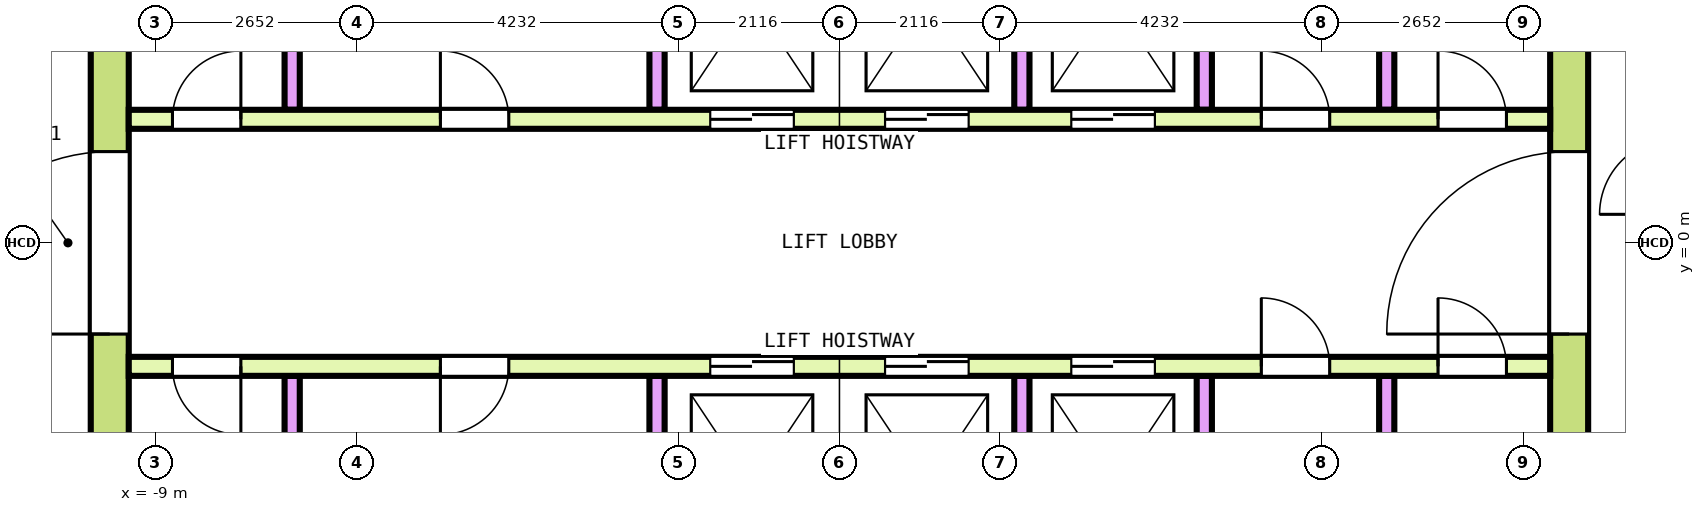
"""IFC4 building model, lengths in metres.
Left out: names, types, materials, properties, quantities, classifications, styles, units other than length and angle.
Written with IfcOpenShell. Run it as: python <this file> out.ifc"""

import sys

from ifc_helpers import new_model, si_unit, direction, frame, frame_2d, origin, place, context, subcontext, project, spatial, rectangle, extrude, element, fill, save


model = new_model("IFC4")
c1 = context("Model", 3, precision=1e-05, world=origin(), true_north=direction((0.0, 1.0)))
c2 = subcontext(c1, "Body", "Model", "MODEL_VIEW")
j1 = project(units=[si_unit("LENGTHUNIT", "METRE"), si_unit("PLANEANGLEUNIT", "RADIAN")], contexts=[c1])
p1 = place(None, origin())
s1 = spatial("IfcSite", under=j1, at=p1, CompositionType="ELEMENT")
p2 = place(p1, origin())
s2 = spatial("IfcBuilding", under=s1, at=p2, CompositionType="ELEMENT")
p3 = place(p2, frame((0.0, 0.0, 253.4)))
s3 = spatial("IfcBuildingStorey", under=s2, at=p3, CompositionType="ELEMENT", Elevation=253.4)
p4 = place(p3, frame((-9.6, -7.8, 0.0), z_axis=(0.0, 0.0, 1.0), x_axis=(0.0, 1.0, 0.0)))
e1 = element("IfcWall", 1, at=p4, inside=s3, PredefinedType="SHEAR", context=c2, shape_type="SweptSolid", body=[
    extrude(rectangle(XDim=15.6, YDim=0.5, at=frame_2d((7.8, 0.0))), origin(), (0.0, 0.0, 1.0), 3.7),
])
p5 = place(p4, frame((6.6, 0.0, 0.0)))
e2 = element("IfcOpeningElement", 2, at=p5, cuts=e1, PredefinedType="OPENING", context=c2, shape_type="SweptSolid", body=[
    extrude(rectangle(XDim=2.4, YDim=2.1, at=frame_2d((1.2, 1.05))), frame((0.0, 0.26, 0.0), z_axis=(0.0, -1.0, 0.0), x_axis=(1.0, 0.0, 0.0)), (0.0, 0.0, 1.0), 0.52),
])
p6 = place(p4, frame((13.5, 0.0, 0.0)))
e3 = element("IfcOpeningElement", 3, at=p6, cuts=e1, PredefinedType="OPENING", context=c2, shape_type="SweptSolid", body=[
    extrude(rectangle(XDim=1.2, YDim=2.1, at=frame_2d((0.6, 1.05))), frame((0.0, 0.26, 0.0), z_axis=(0.0, -1.0, 0.0), x_axis=(1.0, 0.0, 0.0)), (0.0, 0.0, 1.0), 0.52),
])
p7 = place(p4, frame((0.9, 0.0, 0.0)))
e4 = element("IfcOpeningElement", 4, at=p7, cuts=e1, PredefinedType="OPENING", context=c2, shape_type="SweptSolid", body=[
    extrude(rectangle(XDim=1.2, YDim=2.1, at=frame_2d((0.6, 1.05))), frame((0.0, 0.26, 0.0), z_axis=(0.0, -1.0, 0.0), x_axis=(1.0, 0.0, 0.0)), (0.0, 0.0, 1.0), 0.52),
])
p8 = place(p3, frame((9.6, -7.8, 0.0), z_axis=(0.0, 0.0, 1.0), x_axis=(0.0, 1.0, 0.0)))
e5 = element("IfcWall", 5, at=p8, inside=s3, PredefinedType="SHEAR", context=c2, shape_type="SweptSolid", body=[
    extrude(rectangle(XDim=15.6, YDim=0.5, at=frame_2d((7.8, 0.0))), origin(), (0.0, 0.0, 1.0), 3.7),
])
p9 = place(p8, frame((6.6, 0.0, 0.0)))
e6 = element("IfcOpeningElement", 6, at=p9, cuts=e5, PredefinedType="OPENING", context=c2, shape_type="SweptSolid", body=[
    extrude(rectangle(XDim=2.4, YDim=2.1, at=frame_2d((1.2, 1.05))), frame((0.0, 0.26, 0.0), z_axis=(0.0, -1.0, 0.0), x_axis=(1.0, 0.0, 0.0)), (0.0, 0.0, 1.0), 0.52),
])
p10 = place(p8, frame((13.5, 0.0, 0.0)))
e7 = element("IfcOpeningElement", 7, at=p10, cuts=e5, PredefinedType="OPENING", context=c2, shape_type="SweptSolid", body=[
    extrude(rectangle(XDim=1.2, YDim=2.1, at=frame_2d((0.6, 1.05))), frame((0.0, 0.26, 0.0), z_axis=(0.0, -1.0, 0.0), x_axis=(1.0, 0.0, 0.0)), (0.0, 0.0, 1.0), 0.52),
])
p11 = place(p8, frame((1.0, 0.0, 0.0)))
e8 = element("IfcOpeningElement", 8, at=p11, cuts=e5, PredefinedType="OPENING", context=c2, shape_type="SweptSolid", body=[
    extrude(rectangle(XDim=1.0, YDim=2.1, at=frame_2d((0.5, 1.05))), frame((0.0, 0.26, 0.0), z_axis=(0.0, -1.0, 0.0), x_axis=(1.0, 0.0, 0.0)), (0.0, 0.0, 1.0), 0.52),
])
p12 = place(p3, frame((-9.35, 1.625, 0.0), z_axis=(0.0, 0.0, 1.0), x_axis=(1.0, 0.0, 0.0)))
e9 = element("IfcWall", 9, at=p12, inside=s3, PredefinedType="SOLIDWALL", context=c2, shape_type="SweptSolid", body=[
    extrude(rectangle(XDim=18.7, YDim=0.25, at=frame_2d((9.35, 0.0))), origin(), (0.0, 0.0, 1.0), 3.7),
])
p13 = place(p12, frame((7.65, 0.0, 0.0)))
e10 = element("IfcOpeningElement", 10, at=p13, cuts=e9, PredefinedType="OPENING", context=c2, shape_type="SweptSolid", body=[
    extrude(rectangle(XDim=1.1, YDim=2.1, at=frame_2d((0.55, 1.05))), frame((0.0, 0.135, 0.0), z_axis=(0.0, -1.0, 0.0), x_axis=(1.0, 0.0, 0.0)), (0.0, 0.0, 1.0), 0.27),
])
p14 = place(p12, frame((9.95, 0.0, 0.0)))
e11 = element("IfcOpeningElement", 11, at=p14, cuts=e9, PredefinedType="OPENING", context=c2, shape_type="SweptSolid", body=[
    extrude(rectangle(XDim=1.1, YDim=2.1, at=frame_2d((0.55, 1.05))), frame((0.0, 0.135, 0.0), z_axis=(0.0, -1.0, 0.0), x_axis=(1.0, 0.0, 0.0)), (0.0, 0.0, 1.0), 0.27),
])
p15 = place(p12, frame((12.4, 0.0, 0.0)))
e12 = element("IfcOpeningElement", 12, at=p15, cuts=e9, PredefinedType="OPENING", context=c2, shape_type="SweptSolid", body=[
    extrude(rectangle(XDim=1.1, YDim=2.1, at=frame_2d((0.55, 1.05))), frame((0.0, 0.135, 0.0), z_axis=(0.0, -1.0, 0.0), x_axis=(1.0, 0.0, 0.0)), (0.0, 0.0, 1.0), 0.27),
])
p16 = place(p12, frame((0.575, 0.0, 0.0)))
e13 = element("IfcOpeningElement", 13, at=p16, cuts=e9, PredefinedType="OPENING", context=c2, shape_type="SweptSolid", body=[
    extrude(rectangle(XDim=0.9, YDim=2.1, at=frame_2d((0.45, 1.05))), frame((0.0, 0.135, 0.0), z_axis=(0.0, -1.0, 0.0), x_axis=(1.0, 0.0, 0.0)), (0.0, 0.0, 1.0), 0.27),
])
p17 = place(p12, frame((4.1, 0.0, 0.0)))
e14 = element("IfcOpeningElement", 14, at=p17, cuts=e9, PredefinedType="OPENING", context=c2, shape_type="SweptSolid", body=[
    extrude(rectangle(XDim=0.9, YDim=2.1, at=frame_2d((0.45, 1.05))), frame((0.0, 0.135, 0.0), z_axis=(0.0, -1.0, 0.0), x_axis=(1.0, 0.0, 0.0)), (0.0, 0.0, 1.0), 0.27),
])
p18 = place(p12, frame((14.9, 0.0, 0.0)))
e15 = element("IfcOpeningElement", 15, at=p18, cuts=e9, PredefinedType="OPENING", context=c2, shape_type="SweptSolid", body=[
    extrude(rectangle(XDim=0.9, YDim=2.1, at=frame_2d((0.45, 1.05))), frame((0.0, 0.135, 0.0), z_axis=(0.0, -1.0, 0.0), x_axis=(1.0, 0.0, 0.0)), (0.0, 0.0, 1.0), 0.27),
])
p19 = place(p12, frame((17.225, 0.0, 0.0)))
e16 = element("IfcOpeningElement", 16, at=p19, cuts=e9, PredefinedType="OPENING", context=c2, shape_type="SweptSolid", body=[
    extrude(rectangle(XDim=0.9, YDim=2.1, at=frame_2d((0.45, 1.05))), frame((0.0, 0.135, 0.0), z_axis=(0.0, -1.0, 0.0), x_axis=(1.0, 0.0, 0.0)), (0.0, 0.0, 1.0), 0.27),
])
for number, where, z_axis, x_axis in (
    (17, (-7.2, 1.75, 0.0), (0.0, 0.0, 1.0), (0.0, 1.0, 0.0)),
    (18, (-2.4, 1.75, 0.0), (0.0, 0.0, 1.0), (0.0, 1.0, 0.0)),
    (19, (2.4, 1.75, 0.0), (0.0, 0.0, 1.0), (0.0, 1.0, 0.0)),
    (20, (4.8, 1.75, 0.0), (0.0, 0.0, 1.0), (0.0, 1.0, 0.0)),
    (21, (7.2, 1.75, 0.0), (0.0, 0.0, 1.0), (0.0, 1.0, 0.0)),
):
    element("IfcWall", number, at=place(p3, frame(where, z_axis=z_axis, x_axis=x_axis)), inside=s3, PredefinedType="SOLIDWALL", context=c2, shape_type="SweptSolid", body=[
        extrude(rectangle(XDim=2.9, YDim=0.2, at=frame_2d((1.45, 0.0))), origin(), (0.0, 0.0, 1.0), 3.7),
    ])
p20 = place(p3, frame((-9.35, -1.625, 0.0), z_axis=(0.0, 0.0, 1.0), x_axis=(1.0, 0.0, 0.0)))
e22 = element("IfcWall", 22, at=p20, inside=s3, PredefinedType="SOLIDWALL", context=c2, shape_type="SweptSolid", body=[
    extrude(rectangle(XDim=18.7, YDim=0.25, at=frame_2d((9.35, 0.0))), origin(), (0.0, 0.0, 1.0), 3.7),
])
p21 = place(p20, frame((7.65, 0.0, 0.0)))
e23 = element("IfcOpeningElement", 23, at=p21, cuts=e22, PredefinedType="OPENING", context=c2, shape_type="SweptSolid", body=[
    extrude(rectangle(XDim=1.1, YDim=2.1, at=frame_2d((0.55, 1.05))), frame((0.0, 0.135, 0.0), z_axis=(0.0, -1.0, 0.0), x_axis=(1.0, 0.0, 0.0)), (0.0, 0.0, 1.0), 0.27),
])
p22 = place(p20, frame((9.95, 0.0, 0.0)))
e24 = element("IfcOpeningElement", 24, at=p22, cuts=e22, PredefinedType="OPENING", context=c2, shape_type="SweptSolid", body=[
    extrude(rectangle(XDim=1.1, YDim=2.1, at=frame_2d((0.55, 1.05))), frame((0.0, 0.135, 0.0), z_axis=(0.0, -1.0, 0.0), x_axis=(1.0, 0.0, 0.0)), (0.0, 0.0, 1.0), 0.27),
])
p23 = place(p20, frame((12.4, 0.0, 0.0)))
e25 = element("IfcOpeningElement", 25, at=p23, cuts=e22, PredefinedType="OPENING", context=c2, shape_type="SweptSolid", body=[
    extrude(rectangle(XDim=1.1, YDim=2.1, at=frame_2d((0.55, 1.05))), frame((0.0, 0.135, 0.0), z_axis=(0.0, -1.0, 0.0), x_axis=(1.0, 0.0, 0.0)), (0.0, 0.0, 1.0), 0.27),
])
p24 = place(p20, frame((0.575, 0.0, 0.0)))
e26 = element("IfcOpeningElement", 26, at=p24, cuts=e22, PredefinedType="OPENING", context=c2, shape_type="SweptSolid", body=[
    extrude(rectangle(XDim=0.9, YDim=2.1, at=frame_2d((0.45, 1.05))), frame((0.0, 0.135, 0.0), z_axis=(0.0, -1.0, 0.0), x_axis=(1.0, 0.0, 0.0)), (0.0, 0.0, 1.0), 0.27),
])
p25 = place(p20, frame((4.1, 0.0, 0.0)))
e27 = element("IfcOpeningElement", 27, at=p25, cuts=e22, PredefinedType="OPENING", context=c2, shape_type="SweptSolid", body=[
    extrude(rectangle(XDim=0.9, YDim=2.1, at=frame_2d((0.45, 1.05))), frame((0.0, 0.135, 0.0), z_axis=(0.0, -1.0, 0.0), x_axis=(1.0, 0.0, 0.0)), (0.0, 0.0, 1.0), 0.27),
])
p26 = place(p20, frame((14.9, 0.0, 0.0)))
e28 = element("IfcOpeningElement", 28, at=p26, cuts=e22, PredefinedType="OPENING", context=c2, shape_type="SweptSolid", body=[
    extrude(rectangle(XDim=0.9, YDim=2.1, at=frame_2d((0.45, 1.05))), frame((0.0, 0.135, 0.0), z_axis=(0.0, -1.0, 0.0), x_axis=(1.0, 0.0, 0.0)), (0.0, 0.0, 1.0), 0.27),
])
p27 = place(p20, frame((17.225, 0.0, 0.0)))
e29 = element("IfcOpeningElement", 29, at=p27, cuts=e22, PredefinedType="OPENING", context=c2, shape_type="SweptSolid", body=[
    extrude(rectangle(XDim=0.9, YDim=2.1, at=frame_2d((0.45, 1.05))), frame((0.0, 0.135, 0.0), z_axis=(0.0, -1.0, 0.0), x_axis=(1.0, 0.0, 0.0)), (0.0, 0.0, 1.0), 0.27),
])
for number, where, z_axis, x_axis in (
    (30, (-7.2, -4.65, 0.0), (0.0, 0.0, 1.0), (0.0, 1.0, 0.0)),
    (31, (-2.4, -4.65, 0.0), (0.0, 0.0, 1.0), (0.0, 1.0, 0.0)),
    (32, (2.4, -4.65, 0.0), (0.0, 0.0, 1.0), (0.0, 1.0, 0.0)),
    (33, (4.8, -4.65, 0.0), (0.0, 0.0, 1.0), (0.0, 1.0, 0.0)),
    (34, (7.2, -4.65, 0.0), (0.0, 0.0, 1.0), (0.0, 1.0, 0.0)),
):
    element("IfcWall", number, at=place(p3, frame(where, z_axis=z_axis, x_axis=x_axis)), inside=s3, PredefinedType="SOLIDWALL", context=c2, shape_type="SweptSolid", body=[
        extrude(rectangle(XDim=2.9, YDim=0.2, at=frame_2d((1.45, 0.0))), origin(), (0.0, 0.0, 1.0), 3.7),
    ])
p28 = place(p13, origin())
e35 = element("IfcDoor", 35, at=p28, inside=s3, OperationType="DOUBLE_DOOR_SLIDING", PredefinedType="DOOR", context=c2, shape_type="SweptSolid", body=[
    extrude(rectangle(XDim=1.1, YDim=2.1, at=frame_2d((0.55, 1.05))), frame((0.0, 0.075, 0.0), z_axis=(0.0, -1.0, 0.0), x_axis=(1.0, 0.0, 0.0)), (0.0, 0.0, 1.0), 0.15),
])
fill(e10, e35)
p29 = place(p14, origin())
e36 = element("IfcDoor", 36, at=p29, inside=s3, OperationType="DOUBLE_DOOR_SLIDING", PredefinedType="DOOR", context=c2, shape_type="SweptSolid", body=[
    extrude(rectangle(XDim=1.1, YDim=2.1, at=frame_2d((0.55, 1.05))), frame((0.0, 0.075, 0.0), z_axis=(0.0, -1.0, 0.0), x_axis=(1.0, 0.0, 0.0)), (0.0, 0.0, 1.0), 0.15),
])
fill(e11, e36)
p30 = place(p15, origin())
e37 = element("IfcDoor", 37, at=p30, inside=s3, OperationType="DOUBLE_DOOR_SLIDING", PredefinedType="DOOR", context=c2, shape_type="SweptSolid", body=[
    extrude(rectangle(XDim=1.1, YDim=2.1, at=frame_2d((0.55, 1.05))), frame((0.0, 0.075, 0.0), z_axis=(0.0, -1.0, 0.0), x_axis=(1.0, 0.0, 0.0)), (0.0, 0.0, 1.0), 0.15),
])
fill(e12, e37)
p31 = place(p21, origin())
e38 = element("IfcDoor", 38, at=p31, inside=s3, OperationType="DOUBLE_DOOR_SLIDING", PredefinedType="DOOR", context=c2, shape_type="SweptSolid", body=[
    extrude(rectangle(XDim=1.1, YDim=2.1, at=frame_2d((0.55, 1.05))), frame((0.0, 0.075, 0.0), z_axis=(0.0, -1.0, 0.0), x_axis=(1.0, 0.0, 0.0)), (0.0, 0.0, 1.0), 0.15),
])
fill(e23, e38)
p32 = place(p22, origin())
e39 = element("IfcDoor", 39, at=p32, inside=s3, OperationType="DOUBLE_DOOR_SLIDING", PredefinedType="DOOR", context=c2, shape_type="SweptSolid", body=[
    extrude(rectangle(XDim=1.1, YDim=2.1, at=frame_2d((0.55, 1.05))), frame((0.0, 0.075, 0.0), z_axis=(0.0, -1.0, 0.0), x_axis=(1.0, 0.0, 0.0)), (0.0, 0.0, 1.0), 0.15),
])
fill(e24, e39)
p33 = place(p23, origin())
e40 = element("IfcDoor", 40, at=p33, inside=s3, OperationType="DOUBLE_DOOR_SLIDING", PredefinedType="DOOR", context=c2, shape_type="SweptSolid", body=[
    extrude(rectangle(XDim=1.1, YDim=2.1, at=frame_2d((0.55, 1.05))), frame((0.0, 0.075, 0.0), z_axis=(0.0, -1.0, 0.0), x_axis=(1.0, 0.0, 0.0)), (0.0, 0.0, 1.0), 0.15),
])
fill(e25, e40)
p34 = place(p5, origin())
e41 = element("IfcDoor", 41, at=p34, inside=s3, OperationType="DOUBLE_DOOR_SINGLE_SWING", PredefinedType="DOOR", context=c2, shape_type="SweptSolid", body=[
    extrude(rectangle(XDim=2.4, YDim=2.1, at=frame_2d((1.2, 1.05))), frame((0.0, 0.2, 0.0), z_axis=(0.0, -1.0, 0.0), x_axis=(1.0, 0.0, 0.0)), (0.0, 0.0, 1.0), 0.4),
])
fill(e2, e41)
p35 = place(p9, origin())
e42 = element("IfcDoor", 42, at=p35, inside=s3, OperationType="DOUBLE_DOOR_SINGLE_SWING", PredefinedType="DOOR", context=c2, shape_type="SweptSolid", body=[
    extrude(rectangle(XDim=2.4, YDim=2.1, at=frame_2d((1.2, 1.05))), frame((0.0, 0.2, 0.0), z_axis=(0.0, -1.0, 0.0), x_axis=(1.0, 0.0, 0.0)), (0.0, 0.0, 1.0), 0.4),
])
fill(e6, e42)
p36 = place(p16, origin())
e43 = element("IfcDoor", 43, at=p36, inside=s3, OperationType="SINGLE_SWING_RIGHT", PredefinedType="DOOR", context=c2, shape_type="SweptSolid", body=[
    extrude(rectangle(XDim=0.9, YDim=2.1, at=frame_2d((0.45, 1.05))), frame((0.0, 0.075, 0.0), z_axis=(0.0, -1.0, 0.0), x_axis=(1.0, 0.0, 0.0)), (0.0, 0.0, 1.0), 0.15),
])
fill(e13, e43)
p37 = place(p17, origin())
e44 = element("IfcDoor", 44, at=p37, inside=s3, OperationType="SINGLE_SWING_LEFT", PredefinedType="DOOR", context=c2, shape_type="SweptSolid", body=[
    extrude(rectangle(XDim=0.9, YDim=2.1, at=frame_2d((0.45, 1.05))), frame((0.0, 0.075, 0.0), z_axis=(0.0, -1.0, 0.0), x_axis=(1.0, 0.0, 0.0)), (0.0, 0.0, 1.0), 0.15),
])
fill(e14, e44)
p38 = place(p18, origin())
e45 = element("IfcDoor", 45, at=p38, inside=s3, OperationType="SINGLE_SWING_RIGHT", PredefinedType="DOOR", context=c2, shape_type="SweptSolid", body=[
    extrude(rectangle(XDim=0.9, YDim=2.1, at=frame_2d((0.45, 1.05))), frame((0.0, 0.075, 0.0), z_axis=(0.0, -1.0, 0.0), x_axis=(1.0, 0.0, 0.0)), (0.0, 0.0, 1.0), 0.15),
])
fill(e15, e45)
p39 = place(p19, origin())
e46 = element("IfcDoor", 46, at=p39, inside=s3, OperationType="SINGLE_SWING_LEFT", PredefinedType="DOOR", context=c2, shape_type="SweptSolid", body=[
    extrude(rectangle(XDim=0.9, YDim=2.1, at=frame_2d((0.45, 1.05))), frame((0.0, 0.075, 0.0), z_axis=(0.0, -1.0, 0.0), x_axis=(1.0, 0.0, 0.0)), (0.0, 0.0, 1.0), 0.15),
])
fill(e16, e46)
p40 = place(p24, origin())
e47 = element("IfcDoor", 47, at=p40, inside=s3, OperationType="SINGLE_SWING_RIGHT", PredefinedType="DOOR", context=c2, shape_type="SweptSolid", body=[
    extrude(rectangle(XDim=0.9, YDim=2.1, at=frame_2d((0.45, 1.05))), frame((0.0, 0.075, 0.0), z_axis=(0.0, -1.0, 0.0), x_axis=(1.0, 0.0, 0.0)), (0.0, 0.0, 1.0), 0.15),
])
fill(e26, e47)
p41 = place(p25, origin())
e48 = element("IfcDoor", 48, at=p41, inside=s3, OperationType="SINGLE_SWING_LEFT", PredefinedType="DOOR", context=c2, shape_type="SweptSolid", body=[
    extrude(rectangle(XDim=0.9, YDim=2.1, at=frame_2d((0.45, 1.05))), frame((0.0, 0.075, 0.0), z_axis=(0.0, -1.0, 0.0), x_axis=(1.0, 0.0, 0.0)), (0.0, 0.0, 1.0), 0.15),
])
fill(e27, e48)
p42 = place(p26, origin())
e49 = element("IfcDoor", 49, at=p42, inside=s3, OperationType="SINGLE_SWING_RIGHT", PredefinedType="DOOR", context=c2, shape_type="SweptSolid", body=[
    extrude(rectangle(XDim=0.9, YDim=2.1, at=frame_2d((0.45, 1.05))), frame((0.0, 0.075, 0.0), z_axis=(0.0, -1.0, 0.0), x_axis=(1.0, 0.0, 0.0)), (0.0, 0.0, 1.0), 0.15),
])
fill(e28, e49)
p43 = place(p27, origin())
e50 = element("IfcDoor", 50, at=p43, inside=s3, OperationType="SINGLE_SWING_LEFT", PredefinedType="DOOR", context=c2, shape_type="SweptSolid", body=[
    extrude(rectangle(XDim=0.9, YDim=2.1, at=frame_2d((0.45, 1.05))), frame((0.0, 0.075, 0.0), z_axis=(0.0, -1.0, 0.0), x_axis=(1.0, 0.0, 0.0)), (0.0, 0.0, 1.0), 0.15),
])
fill(e29, e50)
save(model, sys.argv[1])
